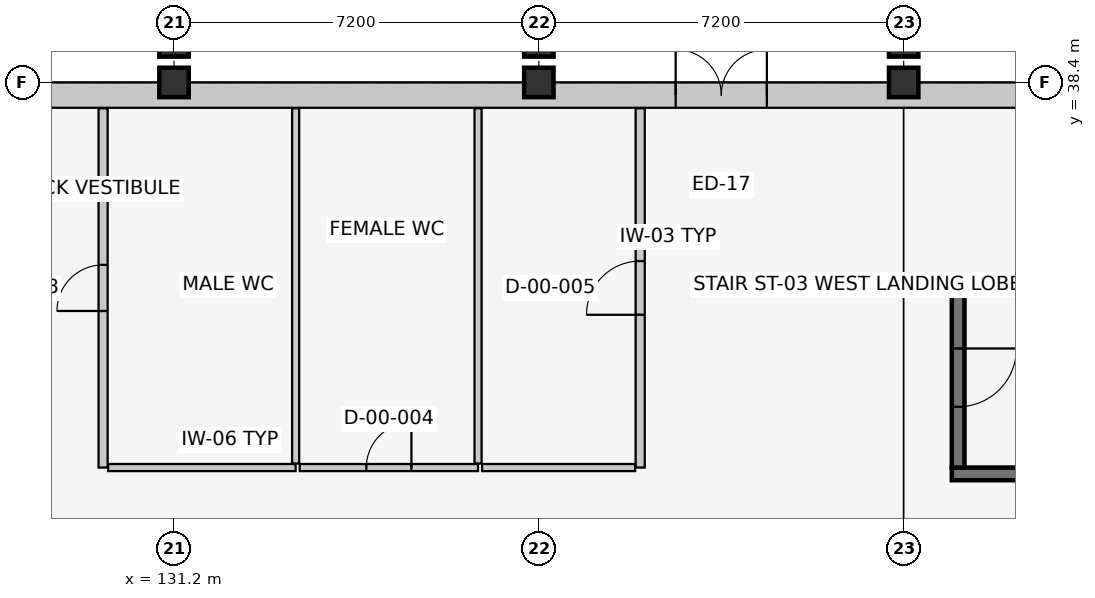
"""IFC4 building model, lengths in metres.
Left out: names, types, materials, properties, quantities, classifications, styles, units other than length and angle.
Written with IfcOpenShell. Run it as: python <this file> out.ifc"""

import sys

from ifc_helpers import new_model, si_unit, direction, frame, frame_2d, origin, origin_2d, place, context, subcontext, project, spatial, rectangle, extrude, element, fill, save


model = new_model("IFC4")
c1 = context("Model", 3, precision=1e-05, world=origin(), true_north=direction((0.0, 1.0)))
c2 = subcontext(c1, "Body", "Model", "MODEL_VIEW")
j1 = project(units=[si_unit("LENGTHUNIT", "METRE"), si_unit("PLANEANGLEUNIT", "RADIAN")], contexts=[c1])
p1 = place(None, origin())
s1 = spatial("IfcSite", under=j1, at=p1, CompositionType="ELEMENT")
p2 = place(p1, origin())
s2 = spatial("IfcBuilding", under=s1, at=p2, CompositionType="ELEMENT")
p3 = place(p2, origin())
s3 = spatial("IfcBuildingStorey", under=s2, at=p3, CompositionType="ELEMENT", Elevation=0.0)
for number, where, z_axis, x_axis in (
    (1, (131.2, 38.4, 0.0), (0.0, 0.0, 1.0), (1.0, 0.0, 0.0)),
    (2, (138.4, 38.4, 0.0), (0.0, 0.0, 1.0), (1.0, 0.0, 0.0)),
    (3, (145.6, 38.4, 0.0), (0.0, 0.0, 1.0), (1.0, 0.0, 0.0)),
    (4, (131.2, 39.2, 0.0), (0.0, 0.0, 1.0), (1.0, 0.0, 0.0)),
    (5, (138.4, 39.2, 0.0), (0.0, 0.0, 1.0), (1.0, 0.0, 0.0)),
    (6, (145.6, 39.2, 0.0), (0.0, 0.0, 1.0), (1.0, 0.0, 0.0)),
):
    element("IfcColumn", number, at=place(p3, frame(where, z_axis=z_axis, x_axis=x_axis)), inside=s3, PredefinedType="COLUMN", context=c2, shape_type="SweptSolid", body=[
        extrude(rectangle(XDim=0.58, YDim=0.58, at=origin_2d()), origin(), (0.0, 0.0, 1.0), 5.4),
    ])
p4 = place(p3, frame((124.0, 38.15, 0.0), z_axis=(0.0, 0.0, 1.0), x_axis=(1.0, 0.0, 0.0)))
e7 = element("IfcWall", 7, at=p4, inside=s3, PredefinedType="SOLIDWALL", context=c2, shape_type="SweptSolid", body=[
    extrude(rectangle(XDim=62.0, YDim=0.5, at=frame_2d((31.0, 0.0))), origin(), (0.0, 0.0, 1.0), 4.275),
])
p5 = place(p4, frame((17.1, 0.0, 0.0)))
e8 = element("IfcOpeningElement", 8, at=p5, cuts=e7, PredefinedType="OPENING", context=c2, shape_type="SweptSolid", body=[
    extrude(rectangle(XDim=1.8, YDim=2.3, at=frame_2d((0.9, 1.15))), frame((0.0, 0.262, 0.0), z_axis=(0.0, -1.0, 0.0), x_axis=(1.0, 0.0, 0.0)), (0.0, 0.0, 1.0), 0.524),
])
p6 = place(p4, frame((1.098, 0.0, 0.9)))
e9 = element("IfcOpeningElement", 9, at=p6, cuts=e7, PredefinedType="OPENING", context=c2, shape_type="SweptSolid", body=[
    extrude(rectangle(XDim=1.45, YDim=1.45, at=frame_2d((0.725, 0.725))), frame((0.0, 0.262, 0.0), z_axis=(0.0, -1.0, 0.0), x_axis=(1.0, 0.0, 0.0)), (0.0, 0.0, 1.0), 0.524),
])
p7 = place(p4, frame((26.853, 0.0, 0.9)))
e10 = element("IfcOpeningElement", 10, at=p7, cuts=e7, PredefinedType="OPENING", context=c2, shape_type="SweptSolid", body=[
    extrude(rectangle(XDim=1.0, YDim=1.75, at=frame_2d((0.5, 0.875))), frame((0.0, 0.262, 0.0), z_axis=(0.0, -1.0, 0.0), x_axis=(1.0, 0.0, 0.0)), (0.0, 0.0, 1.0), 0.524),
])
p8 = place(p4, frame((37.624, 0.0, 0.9)))
e11 = element("IfcOpeningElement", 11, at=p8, cuts=e7, PredefinedType="OPENING", context=c2, shape_type="SweptSolid", body=[
    extrude(rectangle(XDim=1.34, YDim=1.75, at=frame_2d((0.67, 0.875))), frame((0.0, 0.262, 0.0), z_axis=(0.0, -1.0, 0.0), x_axis=(1.0, 0.0, 0.0)), (0.0, 0.0, 1.0), 0.524),
])
p9 = place(p4, frame((41.221, 0.0, 0.9)))
e12 = element("IfcOpeningElement", 12, at=p9, cuts=e7, PredefinedType="OPENING", context=c2, shape_type="SweptSolid", body=[
    extrude(rectangle(XDim=1.44, YDim=1.75, at=frame_2d((0.72, 0.875))), frame((0.0, 0.262, 0.0), z_axis=(0.0, -1.0, 0.0), x_axis=(1.0, 0.0, 0.0)), (0.0, 0.0, 1.0), 0.524),
])
p10 = place(p4, frame((48.785, 0.0, 0.9)))
e13 = element("IfcOpeningElement", 13, at=p10, cuts=e7, PredefinedType="OPENING", context=c2, shape_type="SweptSolid", body=[
    extrude(rectangle(XDim=0.9, YDim=1.35, at=frame_2d((0.45, 0.675))), frame((0.0, 0.262, 0.0), z_axis=(0.0, -1.0, 0.0), x_axis=(1.0, 0.0, 0.0)), (0.0, 0.0, 1.0), 0.524),
])
p11 = place(p4, frame((55.979, 0.0, 0.9)))
e14 = element("IfcOpeningElement", 14, at=p11, cuts=e7, PredefinedType="OPENING", context=c2, shape_type="SweptSolid", body=[
    extrude(rectangle(XDim=1.1, YDim=1.35, at=frame_2d((0.55, 0.675))), frame((0.0, 0.262, 0.0), z_axis=(0.0, -1.0, 0.0), x_axis=(1.0, 0.0, 0.0)), (0.0, 0.0, 1.0), 0.524),
])
p12 = place(p4, frame((59.576, 0.0, 0.9)))
e15 = element("IfcOpeningElement", 15, at=p12, cuts=e7, PredefinedType="OPENING", context=c2, shape_type="SweptSolid", body=[
    extrude(rectangle(XDim=1.2, YDim=1.35, at=frame_2d((0.6, 0.675))), frame((0.0, 0.262, 0.0), z_axis=(0.0, -1.0, 0.0), x_axis=(1.0, 0.0, 0.0)), (0.0, 0.0, 1.0), 0.524),
])
for number, where, z_axis, x_axis in (
    (16, (146.55, 30.675, 0.0), (0.0, 0.0, 1.0), (1.0, 0.0, 0.0)),
    (17, (155.45, 34.475, 0.0), (0.0, 0.0, 1.0), (-1.0, 0.0, 0.0)),
):
    element("IfcWall", number, at=place(p3, frame(where, z_axis=z_axis, x_axis=x_axis)), inside=s3, PredefinedType="SHEAR", context=c2, shape_type="SweptSolid", body=[
        extrude(rectangle(XDim=8.9, YDim=0.25, at=frame_2d((4.45, 0.0))), origin(), (0.0, 0.0, 1.0), 5.12),
    ])
p13 = place(p3, frame((146.675, 34.35, 0.0), z_axis=(0.0, 0.0, 1.0), x_axis=(0.0, -1.0, 0.0)))
e18 = element("IfcWall", 18, at=p13, inside=s3, PredefinedType="SHEAR", context=c2, shape_type="SweptSolid", body=[
    extrude(rectangle(XDim=3.55, YDim=0.25, at=frame_2d((1.775, 0.0))), origin(), (0.0, 0.0, 1.0), 5.12),
])
p14 = place(p13, frame((1.2, 0.0, 0.0)))
e19 = element("IfcOpeningElement", 19, at=p14, cuts=e18, PredefinedType="OPENING", context=c2, shape_type="SweptSolid", body=[
    extrude(rectangle(XDim=1.15, YDim=2.15, at=frame_2d((0.575, 1.075))), frame((0.0, 0.137, 0.0), z_axis=(0.0, -1.0, 0.0), x_axis=(1.0, 0.0, 0.0)), (0.0, 0.0, 1.0), 0.274),
])
p15 = place(p3, frame((140.4, 30.8, 0.0), z_axis=(0.0, 0.0, 1.0), x_axis=(0.0, 1.0, 0.0)))
e20 = element("IfcWall", 20, at=p15, inside=s3, PredefinedType="PARTITIONING", context=c2, shape_type="SweptSolid", body=[
    extrude(rectangle(XDim=7.09, YDim=0.18, at=frame_2d((3.545, 0.0))), origin(), (0.0, 0.0, 1.0), 5.12),
])
p16 = place(p15, frame((3.015, 0.0, 0.0)))
e21 = element("IfcOpeningElement", 21, at=p16, cuts=e20, PredefinedType="OPENING", context=c2, shape_type="SweptSolid", body=[
    extrude(rectangle(XDim=1.06, YDim=2.1, at=frame_2d((0.53, 1.05))), frame((0.0, 0.102, 0.0), z_axis=(0.0, -1.0, 0.0), x_axis=(1.0, 0.0, 0.0)), (0.0, 0.0, 1.0), 0.204),
])
p17 = place(p3, frame((129.8, 30.8, 0.0), z_axis=(0.0, 0.0, 1.0), x_axis=(0.0, 1.0, 0.0)))
e22 = element("IfcWall", 22, at=p17, inside=s3, PredefinedType="PARTITIONING", context=c2, shape_type="SweptSolid", body=[
    extrude(rectangle(XDim=7.09, YDim=0.18, at=frame_2d((3.545, 0.0))), origin(), (0.0, 0.0, 1.0), 5.12),
])
p18 = place(p17, frame((3.09, 0.0, 0.0)))
e23 = element("IfcOpeningElement", 23, at=p18, cuts=e22, PredefinedType="OPENING", context=c2, shape_type="SweptSolid", body=[
    extrude(rectangle(XDim=0.91, YDim=2.06, at=frame_2d((0.455, 1.03))), frame((0.0, 0.102, 0.0), z_axis=(0.0, -1.0, 0.0), x_axis=(1.0, 0.0, 0.0)), (0.0, 0.0, 1.0), 0.204),
])
p19 = place(p3, frame((129.9, 30.8, 0.0), z_axis=(0.0, 0.0, 1.0), x_axis=(1.0, 0.0, 0.0)))
e24 = element("IfcWall", 24, at=p19, inside=s3, PredefinedType="PARTITIONING", context=c2, shape_type="SweptSolid", body=[
    extrude(rectangle(XDim=3.7, YDim=0.14, at=frame_2d((1.85, 0.0))), origin(), (0.0, 0.0, 1.0), 5.12),
])
p20 = place(p3, frame((133.6, 30.88, 0.0), z_axis=(0.0, 0.0, 1.0), x_axis=(0.0, 1.0, 0.0)))
e25 = element("IfcWall", 25, at=p20, inside=s3, PredefinedType="PARTITIONING", context=c2, shape_type="SweptSolid", body=[
    extrude(rectangle(XDim=7.01, YDim=0.14, at=frame_2d((3.505, 0.0))), origin(), (0.0, 0.0, 1.0), 5.12),
])
p21 = place(p3, frame((133.68, 30.8, 0.0), z_axis=(0.0, 0.0, 1.0), x_axis=(1.0, 0.0, 0.0)))
e26 = element("IfcWall", 26, at=p21, inside=s3, PredefinedType="PARTITIONING", context=c2, shape_type="SweptSolid", body=[
    extrude(rectangle(XDim=3.52, YDim=0.14, at=frame_2d((1.76, 0.0))), origin(), (0.0, 0.0, 1.0), 5.12),
])
p22 = place(p21, frame((1.315, 0.0, 0.0)))
e27 = element("IfcOpeningElement", 27, at=p22, cuts=e26, PredefinedType="OPENING", context=c2, shape_type="SweptSolid", body=[
    extrude(rectangle(XDim=0.89, YDim=2.05, at=frame_2d((0.445, 1.025))), frame((0.0, 0.082, 0.0), z_axis=(0.0, -1.0, 0.0), x_axis=(1.0, 0.0, 0.0)), (0.0, 0.0, 1.0), 0.164),
])
p23 = place(p3, frame((137.2, 30.88, 0.0), z_axis=(0.0, 0.0, 1.0), x_axis=(0.0, 1.0, 0.0)))
e28 = element("IfcWall", 28, at=p23, inside=s3, PredefinedType="PARTITIONING", context=c2, shape_type="SweptSolid", body=[
    extrude(rectangle(XDim=7.01, YDim=0.14, at=frame_2d((3.505, 0.0))), origin(), (0.0, 0.0, 1.0), 5.12),
])
p24 = place(p3, frame((137.28, 30.8, 0.0), z_axis=(0.0, 0.0, 1.0), x_axis=(1.0, 0.0, 0.0)))
e29 = element("IfcWall", 29, at=p24, inside=s3, PredefinedType="PARTITIONING", context=c2, shape_type="SweptSolid", body=[
    extrude(rectangle(XDim=3.02, YDim=0.14, at=frame_2d((1.51, 0.0))), origin(), (0.0, 0.0, 1.0), 5.12),
])
p25 = place(p5, origin())
e30 = element("IfcDoor", 30, at=p25, inside=s3, OperationType="DOUBLE_DOOR_SINGLE_SWING", PredefinedType="DOOR", context=c2, shape_type="SweptSolid", body=[
    extrude(rectangle(XDim=1.8, YDim=2.3, at=frame_2d((0.9, 1.15))), frame((0.0, 0.025, 0.0), z_axis=(0.0, -1.0, 0.0), x_axis=(1.0, 0.0, 0.0)), (0.0, 0.0, 1.0), 0.05),
])
fill(e8, e30)
p26 = place(p14, origin())
e31 = element("IfcDoor", 31, at=p26, inside=s3, OperationType="SINGLE_SWING_LEFT", PredefinedType="DOOR", context=c2, shape_type="SweptSolid", body=[
    extrude(rectangle(XDim=1.15, YDim=2.15, at=frame_2d((0.575, 1.075))), frame((0.0, 0.025, 0.0), z_axis=(0.0, -1.0, 0.0), x_axis=(1.0, 0.0, 0.0)), (0.0, 0.0, 1.0), 0.05),
])
fill(e19, e31)
p27 = place(p18, origin())
e32 = element("IfcDoor", 32, at=p27, inside=s3, OperationType="SINGLE_SWING_LEFT", PredefinedType="DOOR", context=c2, shape_type="SweptSolid", body=[
    extrude(rectangle(XDim=0.91, YDim=2.06, at=frame_2d((0.455, 1.03))), frame((0.0, 0.025, 0.0), z_axis=(0.0, -1.0, 0.0), x_axis=(1.0, 0.0, 0.0)), (0.0, 0.0, 1.0), 0.05),
])
fill(e23, e32)
p28 = place(p22, origin())
e33 = element("IfcDoor", 33, at=p28, inside=s3, OperationType="SINGLE_SWING_RIGHT", PredefinedType="DOOR", context=c2, shape_type="SweptSolid", body=[
    extrude(rectangle(XDim=0.89, YDim=2.05, at=frame_2d((0.445, 1.025))), frame((0.0, 0.025, 0.0), z_axis=(0.0, -1.0, 0.0), x_axis=(1.0, 0.0, 0.0)), (0.0, 0.0, 1.0), 0.05),
])
fill(e27, e33)
p29 = place(p16, origin())
e34 = element("IfcDoor", 34, at=p29, inside=s3, OperationType="SINGLE_SWING_LEFT", PredefinedType="DOOR", context=c2, shape_type="SweptSolid", body=[
    extrude(rectangle(XDim=1.06, YDim=2.1, at=frame_2d((0.53, 1.05))), frame((0.0, 0.025, 0.0), z_axis=(0.0, -1.0, 0.0), x_axis=(1.0, 0.0, 0.0)), (0.0, 0.0, 1.0), 0.05),
])
fill(e21, e34)
save(model, sys.argv[1])
